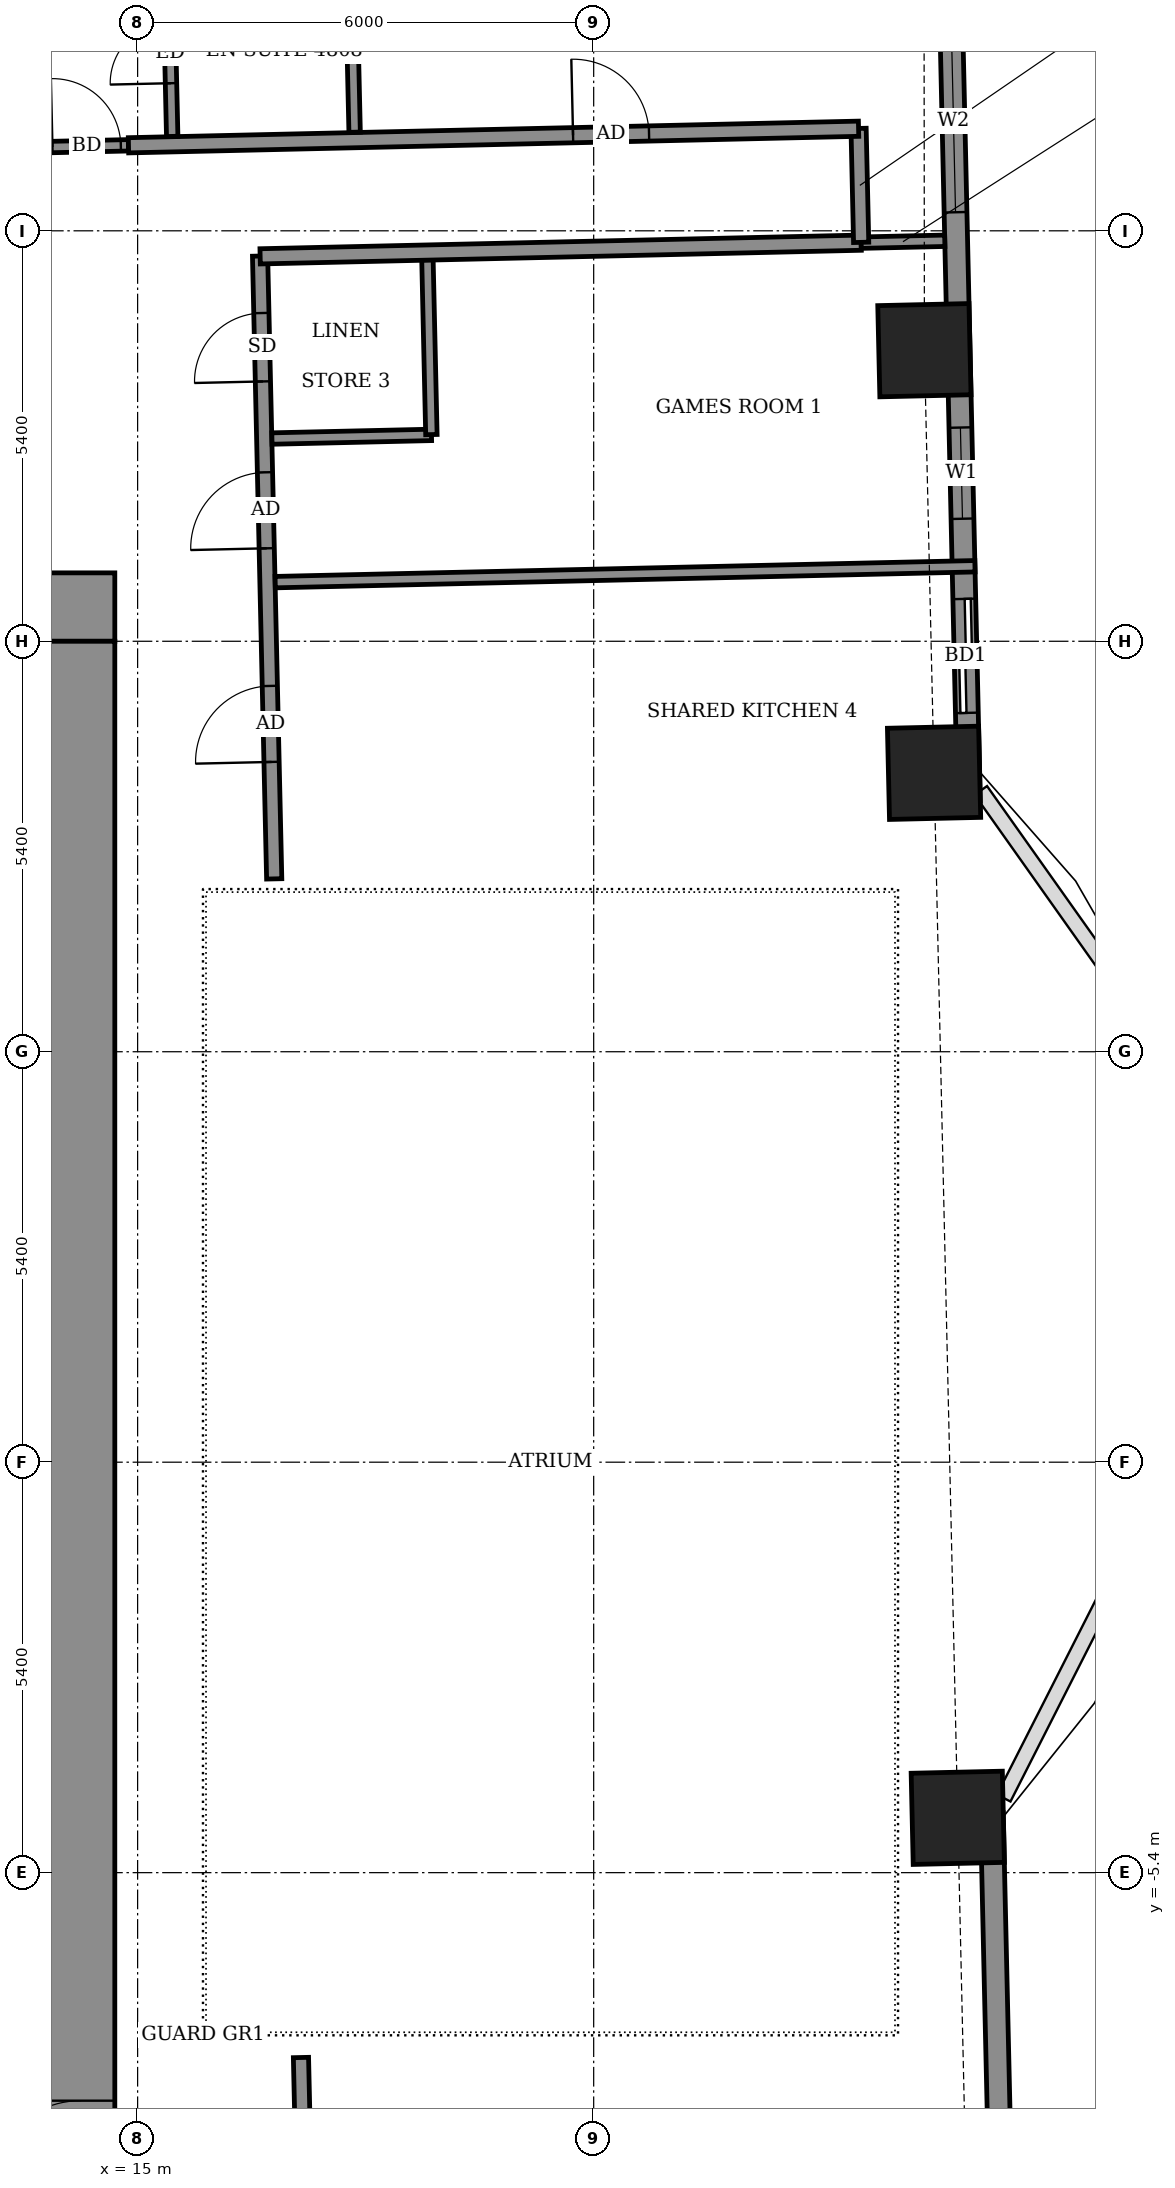
"""IFC4 building model, lengths in metres.
Left out: names, types, materials, properties, quantities, classifications, styles, units other than length and angle.
Written with IfcOpenShell. Run it as: python <this file> out.ifc"""

import sys

from ifc_helpers import new_model, si_unit, direction, frame, frame_2d, origin, origin_2d, place, context, subcontext, project, spatial, rectangle, extrude, element, fill, save


model = new_model("IFC4")
c1 = context("Model", 3, precision=1e-05, world=origin(), true_north=direction((0.0, 1.0)))
c2 = subcontext(c1, "Body", "Model", "MODEL_VIEW")
j1 = project(units=[si_unit("LENGTHUNIT", "METRE"), si_unit("PLANEANGLEUNIT", "RADIAN")], contexts=[c1])
p1 = place(None, origin())
s1 = spatial("IfcSite", under=j1, at=p1, CompositionType="ELEMENT")
p2 = place(p1, origin())
s2 = spatial("IfcBuilding", under=s1, at=p2, CompositionType="ELEMENT")
p3 = place(p2, frame((0.0, 0.0, 189.7)))
s3 = spatial("IfcBuildingStorey", under=s2, at=p3, CompositionType="ELEMENT", Elevation=189.7)
for number, where, z_axis, x_axis in (
    (1, (25.79, -4.678, -0.55), (0.0, 0.0, 1.0), (-0.023, 1.0, 0.0)),
    (2, (25.478, 9.069, -0.55), (0.0, 0.0, 1.0), (-0.023, 1.0, 0.0)),
    (3, (25.351, 14.629, -0.55), (0.0, 0.0, 1.0), (-0.023, 1.0, 0.0)),
):
    element("IfcColumn", number, at=place(p3, frame(where, z_axis=z_axis, x_axis=x_axis)), inside=s3, PredefinedType="COLUMN", context=c2, shape_type="SweptSolid", body=[
        extrude(rectangle(XDim=1.2, YDim=1.2, at=origin_2d()), origin(), (0.0, 0.0, 1.0), 3.6),
    ])
p4 = place(p3, frame((26.466, -14.64, 0.0), z_axis=(0.0, 0.0, 1.0), x_axis=(-0.022735782058, 0.999741508698, 0.0)))
e4 = element("IfcWall", 4, at=p4, inside=s3, PredefinedType="SOLIDWALL", context=c2, shape_type="SweptSolid", body=[
    extrude(rectangle(XDim=10.03, YDim=0.3, at=frame_2d((5.015, 0.0))), origin(), (0.0, 0.0, 1.0), 2.55),
])
p5 = place(p4, frame((1.26, 0.0, 0.0)))
e5 = element("IfcOpeningElement", 5, at=p5, cuts=e4, PredefinedType="OPENING", context=c2, shape_type="SweptSolid", body=[
    extrude(rectangle(XDim=1.2, YDim=2.4, at=frame_2d((0.6, 1.2))), frame((0.0, 0.16, 0.0), z_axis=(0.0, -1.0, 0.0), x_axis=(1.0, 0.0, 0.0)), (0.0, 0.0, 1.0), 0.32),
])
p6 = place(p4, frame((3.006, 0.0, 0.9)))
e6 = element("IfcOpeningElement", 6, at=p6, cuts=e4, PredefinedType="OPENING", context=c2, shape_type="SweptSolid", body=[
    extrude(rectangle(XDim=1.2, YDim=1.5, at=frame_2d((0.6, 0.75))), frame((0.0, 0.16, 0.0), z_axis=(0.0, -1.0, 0.0), x_axis=(1.0, 0.0, 0.0)), (0.0, 0.0, 1.0), 0.32),
])
p7 = place(p3, frame((25.936, 8.697, 0.0), z_axis=(0.0, 0.0, 1.0), x_axis=(-0.022636437932, 0.99974376301, 0.0)))
e7 = element("IfcWall", 7, at=p7, inside=s3, PredefinedType="SOLIDWALL", context=c2, shape_type="SweptSolid", body=[
    extrude(rectangle(XDim=11.357, YDim=0.3, at=frame_2d((5.678, 0.0))), origin(), (0.0, 0.0, 1.0), 3.05),
])
p8 = place(p7, frame((1.161, 0.0, 0.0)))
e8 = element("IfcOpeningElement", 8, at=p8, cuts=e7, PredefinedType="OPENING", context=c2, shape_type="SweptSolid", body=[
    extrude(rectangle(XDim=1.5, YDim=2.4, at=frame_2d((0.75, 1.2))), frame((0.0, 0.16, 0.0), z_axis=(0.0, -1.0, 0.0), x_axis=(1.0, 0.0, 0.0)), (0.0, 0.0, 1.0), 0.32),
])
p9 = place(p7, frame((3.716, 0.0, 0.9)))
e9 = element("IfcOpeningElement", 9, at=p9, cuts=e7, PredefinedType="OPENING", context=c2, shape_type="SweptSolid", body=[
    extrude(rectangle(XDim=1.2, YDim=1.5, at=frame_2d((0.6, 0.75))), frame((0.0, 0.16, 0.0), z_axis=(0.0, -1.0, 0.0), x_axis=(1.0, 0.0, 0.0)), (0.0, 0.0, 1.0), 0.32),
])
p10 = place(p7, frame((7.749, 0.0, 0.9)))
e10 = element("IfcOpeningElement", 10, at=p10, cuts=e7, PredefinedType="OPENING", context=c2, shape_type="SweptSolid", body=[
    extrude(rectangle(XDim=2.4, YDim=1.5, at=frame_2d((1.2, 0.75))), frame((0.0, 0.16, 0.0), z_axis=(0.0, -1.0, 0.0), x_axis=(1.0, 0.0, 0.0)), (0.0, 0.0, 1.0), 0.32),
])
p11 = place(p3, frame((17.247, -12.149, 0.0), z_axis=(0.0, 0.0, 1.0), x_axis=(-0.022729111383, 0.999741660378, 0.0)))
e11 = element("IfcWall", 11, at=p11, inside=s3, PredefinedType="PARTITIONING", context=c2, shape_type="SweptSolid", body=[
    extrude(rectangle(XDim=4.318, YDim=0.2, at=frame_2d((2.159, 0.0))), origin(), (0.0, 0.0, 1.0), 3.05),
])
p12 = place(p3, frame((16.797, 7.674, 0.0), z_axis=(0.0, 0.0, 1.0), x_axis=(-0.022698399288, 0.999742358145, 0.0)))
e12 = element("IfcWall", 12, at=p12, inside=s3, PredefinedType="PARTITIONING", context=c2, shape_type="SweptSolid", body=[
    extrude(rectangle(XDim=8.196, YDim=0.2, at=frame_2d((4.098, 0.0))), origin(), (0.0, 0.0, 1.0), 3.05),
])
p13 = place(p12, frame((1.539, 0.0, 0.0)))
e13 = element("IfcOpeningElement", 13, at=p13, cuts=e12, PredefinedType="OPENING", context=c2, shape_type="SweptSolid", body=[
    extrude(rectangle(XDim=1.0, YDim=2.1, at=frame_2d((0.5, 1.05))), frame((0.0, 0.11, 0.0), z_axis=(0.0, -1.0, 0.0), x_axis=(1.0, 0.0, 0.0)), (0.0, 0.0, 1.0), 0.22),
])
p14 = place(p12, frame((4.35, 0.0, 0.0)))
e14 = element("IfcOpeningElement", 14, at=p14, cuts=e12, PredefinedType="OPENING", context=c2, shape_type="SweptSolid", body=[
    extrude(rectangle(XDim=1.0, YDim=2.1, at=frame_2d((0.5, 1.05))), frame((0.0, 0.11, 0.0), z_axis=(0.0, -1.0, 0.0), x_axis=(1.0, 0.0, 0.0)), (0.0, 0.0, 1.0), 0.22),
])
p15 = place(p12, frame((6.546, 0.0, 0.0)))
e15 = element("IfcOpeningElement", 15, at=p15, cuts=e12, PredefinedType="OPENING", context=c2, shape_type="SweptSolid", body=[
    extrude(rectangle(XDim=0.9, YDim=2.1, at=frame_2d((0.45, 1.05))), frame((0.0, 0.11, 0.0), z_axis=(0.0, -1.0, 0.0), x_axis=(1.0, 0.0, 0.0)), (0.0, 0.0, 1.0), 0.22),
])
p16 = place(p3, frame((16.81, 11.578, 0.0), z_axis=(0.0, 0.0, 1.0), x_axis=(0.999741835545, 0.022721405353, 0.0)))
e16 = element("IfcWall", 16, at=p16, inside=s3, PredefinedType="PARTITIONING", context=c2, shape_type="SweptSolid", body=[
    extrude(rectangle(XDim=9.208, YDim=0.15, at=frame_2d((4.604, 0.0))), origin(), (0.0, 0.0, 1.0), 2.55),
])
p17 = place(p3, frame((16.767, 13.467, 0.0), z_axis=(0.0, 0.0, 1.0), x_axis=(0.999740212033, 0.022792727877, 0.0)))
e17 = element("IfcWall", 17, at=p17, inside=s3, PredefinedType="PARTITIONING", context=c2, shape_type="SweptSolid", body=[
    extrude(rectangle(XDim=2.099, YDim=0.15, at=frame_2d((1.05, 0.0))), origin(), (0.0, 0.0, 1.0), 3.05),
])
p18 = place(p3, frame((18.865, 13.519, 0.0), z_axis=(0.0, 0.0, 1.0), x_axis=(-0.022612884682, 0.999744296031, 0.0)))
e18 = element("IfcWall", 18, at=p18, inside=s3, PredefinedType="PARTITIONING", context=c2, shape_type="SweptSolid", body=[
    extrude(rectangle(XDim=2.3, YDim=0.15, at=frame_2d((1.15, 0.0))), origin(), (0.0, 0.0, 1.0), 3.05),
])
p19 = place(p3, frame((16.612, 15.864, 0.0), z_axis=(0.0, 0.0, 1.0), x_axis=(0.999741181744, 0.022750154412, 0.0)))
e19 = element("IfcWall", 19, at=p19, inside=s3, PredefinedType="PARTITIONING", context=c2, shape_type="SweptSolid", body=[
    extrude(rectangle(XDim=7.909, YDim=0.2, at=frame_2d((3.955, 0.0))), origin(), (0.0, 0.0, 1.0), 3.05),
])
p20 = place(p3, frame((24.519, 16.044, 0.0), z_axis=(0.0, 0.0, 1.0), x_axis=(0.999738732953, 0.022857511541, 0.0)))
e20 = element("IfcWall", 20, at=p20, inside=s3, PredefinedType="PARTITIONING", context=c2, shape_type="SweptSolid", body=[
    extrude(rectangle(XDim=1.1, YDim=0.15, at=frame_2d((0.55, 0.0))), origin(), (0.0, 0.0, 1.0), 2.55),
])
p21 = place(p3, frame((24.519, 16.048, 0.0), z_axis=(0.0, 0.0, 1.0), x_axis=(-0.022632637625, 0.99974384905, 0.0)))
e21 = element("IfcWall", 21, at=p21, inside=s3, PredefinedType="PARTITIONING", context=c2, shape_type="SweptSolid", body=[
    extrude(rectangle(XDim=1.5, YDim=0.2, at=frame_2d((0.75, 0.0))), origin(), (0.0, 0.0, 1.0), 3.05),
])
p22 = place(p3, frame((-15.649, 16.633, 0.0), z_axis=(0.0, 0.0, 1.0), x_axis=(0.999743261737, 0.022658565952, 0.0)))
e22 = element("IfcWall", 22, at=p22, inside=s3, PredefinedType="PARTITIONING", context=c2, shape_type="SweptSolid", body=[
    extrude(rectangle(XDim=30.536, YDim=0.15, at=frame_2d((15.268, 0.0))), origin(), (0.0, 0.0, 1.0), 3.05),
])
p23 = place(p22, frame((29.536, 0.0, 0.0)))
e23 = element("IfcOpeningElement", 23, at=p23, cuts=e22, PredefinedType="OPENING", context=c2, shape_type="SweptSolid", body=[
    extrude(rectangle(XDim=0.9, YDim=2.1, at=frame_2d((0.45, 1.05))), frame((0.0, 0.085, 0.0), z_axis=(0.0, -1.0, 0.0), x_axis=(1.0, 0.0, 0.0)), (0.0, 0.0, 1.0), 0.17),
])
p24 = place(p22, frame((27.965, 0.0, 0.0)))
e24 = element("IfcOpeningElement", 24, at=p24, cuts=e22, PredefinedType="OPENING", context=c2, shape_type="SweptSolid", body=[
    extrude(rectangle(XDim=0.9, YDim=2.1, at=frame_2d((0.45, 1.05))), frame((0.0, 0.085, 0.0), z_axis=(0.0, -1.0, 0.0), x_axis=(1.0, 0.0, 0.0)), (0.0, 0.0, 1.0), 0.17),
])
p25 = place(p22, frame((21.365, 0.0, 0.0)))
e25 = element("IfcOpeningElement", 25, at=p25, cuts=e22, PredefinedType="OPENING", context=c2, shape_type="SweptSolid", body=[
    extrude(rectangle(XDim=0.9, YDim=2.1, at=frame_2d((0.45, 1.05))), frame((0.0, 0.085, 0.0), z_axis=(0.0, -1.0, 0.0), x_axis=(1.0, 0.0, 0.0)), (0.0, 0.0, 1.0), 0.17),
])
p26 = place(p22, frame((19.565, 0.0, 0.0)))
e26 = element("IfcOpeningElement", 26, at=p26, cuts=e22, PredefinedType="OPENING", context=c2, shape_type="SweptSolid", body=[
    extrude(rectangle(XDim=0.9, YDim=2.1, at=frame_2d((0.45, 1.05))), frame((0.0, 0.085, 0.0), z_axis=(0.0, -1.0, 0.0), x_axis=(1.0, 0.0, 0.0)), (0.0, 0.0, 1.0), 0.17),
])
p27 = place(p22, frame((12.965, 0.0, 0.0)))
e27 = element("IfcOpeningElement", 27, at=p27, cuts=e22, PredefinedType="OPENING", context=c2, shape_type="SweptSolid", body=[
    extrude(rectangle(XDim=0.9, YDim=2.1, at=frame_2d((0.45, 1.05))), frame((0.0, 0.085, 0.0), z_axis=(0.0, -1.0, 0.0), x_axis=(1.0, 0.0, 0.0)), (0.0, 0.0, 1.0), 0.17),
])
p28 = place(p22, frame((11.14, 0.0, 0.0)))
e28 = element("IfcOpeningElement", 28, at=p28, cuts=e22, PredefinedType="OPENING", context=c2, shape_type="SweptSolid", body=[
    extrude(rectangle(XDim=0.9, YDim=2.1, at=frame_2d((0.45, 1.05))), frame((0.0, 0.085, 0.0), z_axis=(0.0, -1.0, 0.0), x_axis=(1.0, 0.0, 0.0)), (0.0, 0.0, 1.0), 0.17),
])
p29 = place(p22, frame((4.515, 0.0, 0.0)))
e29 = element("IfcOpeningElement", 29, at=p29, cuts=e22, PredefinedType="OPENING", context=c2, shape_type="SweptSolid", body=[
    extrude(rectangle(XDim=0.9, YDim=2.1, at=frame_2d((0.45, 1.05))), frame((0.0, 0.085, 0.0), z_axis=(0.0, -1.0, 0.0), x_axis=(1.0, 0.0, 0.0)), (0.0, 0.0, 1.0), 0.17),
])
p30 = place(p22, frame((2.715, 0.0, 0.0)))
e30 = element("IfcOpeningElement", 30, at=p30, cuts=e22, PredefinedType="OPENING", context=c2, shape_type="SweptSolid", body=[
    extrude(rectangle(XDim=0.9, YDim=2.1, at=frame_2d((0.45, 1.05))), frame((0.0, 0.085, 0.0), z_axis=(0.0, -1.0, 0.0), x_axis=(1.0, 0.0, 0.0)), (0.0, 0.0, 1.0), 0.17),
])
p31 = place(p3, frame((14.88, 17.325, 0.0), z_axis=(0.0, 0.0, 1.0), x_axis=(0.999742504166, 0.022691966963, 0.0)))
e31 = element("IfcWall", 31, at=p31, inside=s3, PredefinedType="PARTITIONING", context=c2, shape_type="SweptSolid", body=[
    extrude(rectangle(XDim=9.608, YDim=0.2, at=frame_2d((4.804, 0.0))), origin(), (0.0, 0.0, 1.0), 3.05),
])
p32 = place(p31, frame((5.85, 0.0, 0.0)))
e32 = element("IfcOpeningElement", 32, at=p32, cuts=e31, PredefinedType="OPENING", context=c2, shape_type="SweptSolid", body=[
    extrude(rectangle(XDim=1.0, YDim=2.1, at=frame_2d((0.5, 1.05))), frame((0.0, 0.11, 0.0), z_axis=(0.0, -1.0, 0.0), x_axis=(1.0, 0.0, 0.0)), (0.0, 0.0, 1.0), 0.22),
])
p33 = place(p3, frame((15.455, 17.442, 0.0), z_axis=(0.0, 0.0, 1.0), x_axis=(-0.022603288534, 0.999744513037, 0.0)))
e33 = element("IfcWall", 33, at=p33, inside=s3, PredefinedType="PARTITIONING", context=c2, shape_type="SweptSolid", body=[
    extrude(rectangle(XDim=2.301, YDim=0.15, at=frame_2d((1.15, 0.0))), origin(), (0.0, 0.0, 1.0), 3.05),
])
p34 = place(p33, frame((0.7, 0.0, 0.0)))
e34 = element("IfcOpeningElement", 34, at=p34, cuts=e33, PredefinedType="OPENING", context=c2, shape_type="SweptSolid", body=[
    extrude(rectangle(XDim=0.8, YDim=2.1, at=frame_2d((0.4, 1.05))), frame((0.0, 0.085, 0.0), z_axis=(0.0, -1.0, 0.0), x_axis=(1.0, 0.0, 0.0)), (0.0, 0.0, 1.0), 0.17),
])
p35 = place(p3, frame((17.855, 17.497, 0.0), z_axis=(0.0, 0.0, 1.0), x_axis=(-0.022672114006, 0.999742954587, 0.0)))
e35 = element("IfcWall", 35, at=p35, inside=s3, PredefinedType="PARTITIONING", context=c2, shape_type="SweptSolid", body=[
    extrude(rectangle(XDim=6.526, YDim=0.15, at=frame_2d((3.263, 0.0))), origin(), (0.0, 0.0, 1.0), 2.55),
])
p36 = place(p3, frame((-14.7, 11.25, 0.0), z_axis=(0.0, 0.0, 1.0), x_axis=(1.0, 0.0, 0.0)))
e36 = element("IfcWall", 36, at=p36, inside=s3, PredefinedType="SHEAR", context=c2, shape_type="SweptSolid", body=[
    extrude(rectangle(XDim=29.4, YDim=0.9, at=frame_2d((14.7, 0.0))), origin(), (0.0, 0.0, 1.0), 3.6),
])
p37 = place(p3, frame((14.25, -10.8, 0.0), z_axis=(0.0, 0.0, 1.0), x_axis=(0.0, 1.0, 0.0)))
e37 = element("IfcWall", 37, at=p37, inside=s3, PredefinedType="SHEAR", context=c2, shape_type="SweptSolid", body=[
    extrude(rectangle(XDim=21.6, YDim=0.9, at=frame_2d((10.8, 0.0))), origin(), (0.0, 0.0, 1.0), 3.6),
])
p38 = place(p37, frame((1.2, 0.0, 0.0)))
e38 = element("IfcOpeningElement", 38, at=p38, cuts=e37, PredefinedType="OPENING", context=c2, shape_type="SweptSolid", body=[
    extrude(rectangle(XDim=1.2, YDim=2.1, at=frame_2d((0.6, 1.05))), frame((0.0, 0.46, 0.0), z_axis=(0.0, -1.0, 0.0), x_axis=(1.0, 0.0, 0.0)), (0.0, 0.0, 1.0), 0.92),
])
p39 = place(p8, origin())
e39 = element("IfcDoor", 39, at=p39, inside=s3, OperationType="SLIDING_TO_LEFT", PredefinedType="DOOR", context=c2, shape_type="SweptSolid", body=[
    extrude(rectangle(XDim=1.5, YDim=2.4, at=frame_2d((0.75, 1.2))), frame((0.0, 0.025, 0.0), z_axis=(0.0, -1.0, 0.0), x_axis=(1.0, 0.0, 0.0)), (0.0, 0.0, 1.0), 0.05),
])
fill(e8, e39)
p40 = place(p9, origin())
e40 = element("IfcWindow", 40, at=p40, inside=s3, PartitioningType="SINGLE_PANEL", PredefinedType="WINDOW", context=c2, shape_type="SweptSolid", body=[
    extrude(rectangle(XDim=1.2, YDim=1.5, at=frame_2d((0.6, 0.75))), frame((0.0, 0.03, 0.0), z_axis=(0.0, -1.0, 0.0), x_axis=(1.0, 0.0, 0.0)), (0.0, 0.0, 1.0), 0.06),
])
fill(e9, e40)
p41 = place(p10, origin())
e41 = element("IfcWindow", 41, at=p41, inside=s3, PartitioningType="DOUBLE_PANEL_VERTICAL", PredefinedType="WINDOW", context=c2, shape_type="SweptSolid", body=[
    extrude(rectangle(XDim=2.4, YDim=1.5, at=frame_2d((1.2, 0.75))), frame((0.0, 0.03, 0.0), z_axis=(0.0, -1.0, 0.0), x_axis=(1.0, 0.0, 0.0)), (0.0, 0.0, 1.0), 0.06),
])
fill(e10, e41)
p42 = place(p13, origin())
e42 = element("IfcDoor", 42, at=p42, inside=s3, OperationType="SINGLE_SWING_RIGHT", PredefinedType="DOOR", context=c2, shape_type="SweptSolid", body=[
    extrude(rectangle(XDim=1.0, YDim=2.1, at=frame_2d((0.5, 1.05))), frame((0.0, 0.025, 0.0), z_axis=(0.0, -1.0, 0.0), x_axis=(1.0, 0.0, 0.0)), (0.0, 0.0, 1.0), 0.05),
])
fill(e13, e42)
p43 = place(p14, origin())
e43 = element("IfcDoor", 43, at=p43, inside=s3, OperationType="SINGLE_SWING_LEFT", PredefinedType="DOOR", context=c2, shape_type="SweptSolid", body=[
    extrude(rectangle(XDim=1.0, YDim=2.1, at=frame_2d((0.5, 1.05))), frame((0.0, 0.025, 0.0), z_axis=(0.0, -1.0, 0.0), x_axis=(1.0, 0.0, 0.0)), (0.0, 0.0, 1.0), 0.05),
])
fill(e14, e43)
p44 = place(p15, origin())
e44 = element("IfcDoor", 44, at=p44, inside=s3, OperationType="SINGLE_SWING_LEFT", PredefinedType="DOOR", context=c2, shape_type="SweptSolid", body=[
    extrude(rectangle(XDim=0.9, YDim=2.1, at=frame_2d((0.45, 1.05))), frame((0.0, 0.025, 0.0), z_axis=(0.0, -1.0, 0.0), x_axis=(1.0, 0.0, 0.0)), (0.0, 0.0, 1.0), 0.05),
])
fill(e15, e44)
p45 = place(p32, origin())
e45 = element("IfcDoor", 45, at=p45, inside=s3, OperationType="SINGLE_SWING_RIGHT", PredefinedType="DOOR", context=c2, shape_type="SweptSolid", body=[
    extrude(rectangle(XDim=1.0, YDim=2.1, at=frame_2d((0.5, 1.05))), frame((0.0, 0.025, 0.0), z_axis=(0.0, -1.0, 0.0), x_axis=(1.0, 0.0, 0.0)), (0.0, 0.0, 1.0), 0.05),
])
fill(e32, e45)
p46 = place(p23, origin())
e46 = element("IfcDoor", 46, at=p46, inside=s3, OperationType="SINGLE_SWING_RIGHT", PredefinedType="DOOR", context=c2, shape_type="SweptSolid", body=[
    extrude(rectangle(XDim=0.9, YDim=2.1, at=frame_2d((0.45, 1.05))), frame((0.0, 0.025, 0.0), z_axis=(0.0, -1.0, 0.0), x_axis=(1.0, 0.0, 0.0)), (0.0, 0.0, 1.0), 0.05),
])
fill(e23, e46)
p47 = place(p34, origin())
e47 = element("IfcDoor", 47, at=p47, inside=s3, OperationType="SINGLE_SWING_RIGHT", PredefinedType="DOOR", context=c2, shape_type="SweptSolid", body=[
    extrude(rectangle(XDim=0.8, YDim=2.1, at=frame_2d((0.4, 1.05))), frame((0.0, 0.025, 0.0), z_axis=(0.0, -1.0, 0.0), x_axis=(1.0, 0.0, 0.0)), (0.0, 0.0, 1.0), 0.05),
])
fill(e34, e47)
p48 = place(p38, origin())
e48 = element("IfcDoor", 48, at=p48, inside=s3, OperationType="DOUBLE_DOOR_SINGLE_SWING", PredefinedType="DOOR", context=c2, shape_type="SweptSolid", body=[
    extrude(rectangle(XDim=1.2, YDim=2.1, at=frame_2d((0.6, 1.05))), frame((0.0, 0.025, 0.0), z_axis=(0.0, -1.0, 0.0), x_axis=(1.0, 0.0, 0.0)), (0.0, 0.0, 1.0), 0.05),
])
fill(e38, e48)
save(model, sys.argv[1])
